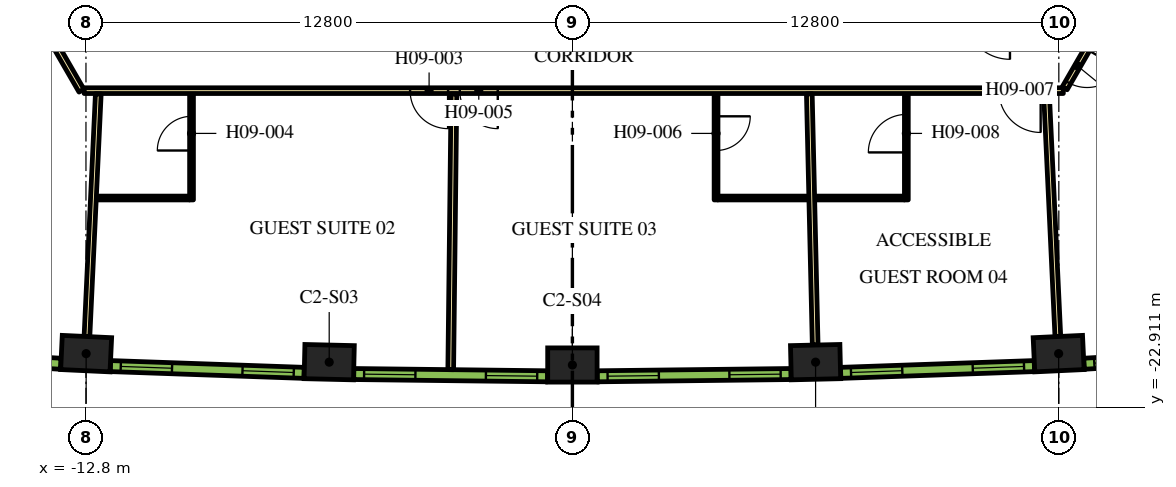
"""IFC4 building model, lengths in metres.
Left out: names, types, materials, properties, quantities, classifications, styles, units other than length and angle.
Written with IfcOpenShell. Run it as: python <this file> out.ifc"""

import sys

from ifc_helpers import new_model, si_unit, direction, frame, frame_2d, origin, origin_2d, place, context, subcontext, project, spatial, rectangle, extrude, element, fill, save


model = new_model("IFC4")
c1 = context("Model", 3, precision=1e-05, world=origin(), true_north=direction((0.0, 1.0)))
c2 = subcontext(c1, "Body", "Model", "MODEL_VIEW")
j1 = project(units=[si_unit("LENGTHUNIT", "METRE"), si_unit("PLANEANGLEUNIT", "RADIAN")], contexts=[c1])
p1 = place(None, origin())
s1 = spatial("IfcSite", under=j1, at=p1, CompositionType="ELEMENT")
p2 = place(p1, origin())
s2 = spatial("IfcBuilding", under=s1, at=p2, CompositionType="ELEMENT")
p3 = place(p2, frame((0.0, 0.0, 118.8)))
s3 = spatial("IfcBuildingStorey", under=s2, at=p3, CompositionType="ELEMENT", Elevation=118.8)
for number, where, z_axis, x_axis in (
    (1, (-12.795, -21.494, 0.0), (0.0, 0.0, 1.0), (0.999, -0.047, 0.0)),
    (2, (-6.399, -21.719, 0.0), (0.0, 0.0, 1.0), (1.0, -0.023, 0.0)),
    (3, (0.0, -21.794, 0.0), (0.0, 0.0, 1.0), (1.0, 0.0, 0.0)),
    (4, (6.399, -21.719, 0.0), (0.0, 0.0, 1.0), (1.0, 0.023, 0.0)),
    (5, (12.795, -21.494, 0.0), (0.0, 0.0, 1.0), (0.999, 0.047, 0.0)),
):
    element("IfcColumn", number, at=place(p3, frame(where, z_axis=z_axis, x_axis=x_axis)), inside=s3, PredefinedType="COLUMN", context=c2, shape_type="SweptSolid", body=[
        extrude(rectangle(XDim=1.3, YDim=0.9, at=origin_2d()), origin(), (0.0, 0.0, 1.0), 3.9),
    ])
p4 = place(p3, frame((-12.918, -14.575, 0.0), z_axis=(0.0, 0.0, 1.0), x_axis=(-0.500009150678, 0.866020120573, 0.0)))
e6 = element("IfcWall", 6, at=p4, inside=s3, PredefinedType="PARTITIONING", context=c2, shape_type="SweptSolid", body=[
    extrude(rectangle(XDim=5.258, YDim=0.15, at=frame_2d((2.629, 0.0))), origin(), (0.0, 0.0, 1.0), 2.75),
])
p5 = place(p3, frame((12.918, -14.575, 0.0), z_axis=(0.0, 0.0, 1.0), x_axis=(-1.0, 0.0, 0.0)))
e7 = element("IfcWall", 7, at=p5, inside=s3, PredefinedType="PARTITIONING", context=c2, shape_type="SweptSolid", body=[
    extrude(rectangle(XDim=25.766, YDim=0.15, at=frame_2d((12.883, 0.0))), origin(), (0.0, 0.0, 1.0), 2.75),
])
p6 = place(p5, frame((16.189, 0.0, 0.0)))
e8 = element("IfcOpeningElement", 8, at=p6, cuts=e7, PredefinedType="OPENING", context=c2, shape_type="SweptSolid", body=[
    extrude(rectangle(XDim=1.0, YDim=2.1, at=frame_2d((0.5, 1.05))), frame((0.0, 0.085, 0.0), z_axis=(0.0, -1.0, 0.0), x_axis=(1.0, 0.0, 0.0)), (0.0, 0.0, 1.0), 0.17),
])
p7 = place(p5, frame((14.882, 0.0, 0.0)))
e9 = element("IfcOpeningElement", 9, at=p7, cuts=e7, PredefinedType="OPENING", context=c2, shape_type="SweptSolid", body=[
    extrude(rectangle(XDim=1.0, YDim=2.1, at=frame_2d((0.5, 1.05))), frame((0.0, 0.085, 0.0), z_axis=(0.0, -1.0, 0.0), x_axis=(1.0, 0.0, 0.0)), (0.0, 0.0, 1.0), 0.17),
])
p8 = place(p5, frame((0.596, 0.0, 0.0)))
e10 = element("IfcOpeningElement", 10, at=p8, cuts=e7, PredefinedType="OPENING", context=c2, shape_type="SweptSolid", body=[
    extrude(rectangle(XDim=1.1, YDim=2.1, at=frame_2d((0.55, 1.05))), frame((0.0, 0.085, 0.0), z_axis=(0.0, -1.0, 0.0), x_axis=(1.0, 0.0, 0.0)), (0.0, 0.0, 1.0), 0.17),
])
p9 = place(p3, frame((15.587, -9.952, 0.0), z_axis=(0.0, 0.0, 1.0), x_axis=(-0.500016618951, -0.866015808616, 0.0)))
e11 = element("IfcWall", 11, at=p9, inside=s3, PredefinedType="PARTITIONING", context=c2, shape_type="SweptSolid", body=[
    extrude(rectangle(XDim=5.268, YDim=0.15, at=frame_2d((2.634, 0.0))), origin(), (0.0, 0.0, 1.0), 2.75),
])
p10 = place(p9, frame((4.088, 0.0, 0.0)))
e12 = element("IfcOpeningElement", 12, at=p10, cuts=e11, PredefinedType="OPENING", context=c2, shape_type="SweptSolid", body=[
    extrude(rectangle(XDim=1.0, YDim=2.1, at=frame_2d((0.5, 1.05))), frame((0.0, 0.085, 0.0), z_axis=(0.0, -1.0, 0.0), x_axis=(1.0, 0.0, 0.0)), (0.0, 0.0, 1.0), 0.17),
])
p11 = place(p3, frame((-12.774, -21.045, 0.0), z_axis=(0.0, 0.0, 1.0), x_axis=(0.046750341626, 0.998906605023, 0.0)))
e13 = element("IfcWall", 13, at=p11, inside=s3, PredefinedType="PARTITIONING", context=c2, shape_type="SweptSolid", body=[
    extrude(rectangle(XDim=6.392, YDim=0.15, at=frame_2d((3.196, 0.0))), origin(), (0.0, 0.0, 1.0), 2.75),
])
p12 = place(p3, frame((-3.202, -21.916, 0.0), z_axis=(0.0, 0.0, 1.0), x_axis=(0.011707696285, 0.999931462575, 0.0)))
e14 = element("IfcWall", 14, at=p12, inside=s3, PredefinedType="PARTITIONING", context=c2, shape_type="SweptSolid", body=[
    extrude(rectangle(XDim=7.257, YDim=0.15, at=frame_2d((3.628, 0.0))), origin(), (0.0, 0.0, 1.0), 2.75),
])
p13 = place(p3, frame((6.389, -21.269, 0.0), z_axis=(0.0, 0.0, 1.0), x_axis=(-0.023377429176, 0.999726710559, 0.0)))
e15 = element("IfcWall", 15, at=p13, inside=s3, PredefinedType="PARTITIONING", context=c2, shape_type="SweptSolid", body=[
    extrude(rectangle(XDim=6.611, YDim=0.15, at=frame_2d((3.305, 0.0))), origin(), (0.0, 0.0, 1.0), 2.75),
])
p14 = place(p3, frame((12.774, -21.045, 0.0), z_axis=(0.0, 0.0, 1.0), x_axis=(-0.046750341626, 0.998906605023, 0.0)))
e16 = element("IfcWall", 16, at=p14, inside=s3, PredefinedType="PARTITIONING", context=c2, shape_type="SweptSolid", body=[
    extrude(rectangle(XDim=6.392, YDim=0.15, at=frame_2d((3.196, 0.0))), origin(), (0.0, 0.0, 1.0), 2.75),
])
p15 = place(p3, frame((-10.022, -17.45, 0.0), z_axis=(0.0, 0.0, 1.0), x_axis=(0.0, 1.0, 0.0)))
e17 = element("IfcWall", 17, at=p15, inside=s3, PredefinedType="PARTITIONING", context=c2, shape_type="SweptSolid", body=[
    extrude(rectangle(XDim=2.8, YDim=0.1, at=frame_2d((1.4, 0.0))), origin(), (0.0, 0.0, 1.0), 2.75),
])
p16 = place(p15, frame((1.3, 0.0, 0.0)))
e18 = element("IfcOpeningElement", 18, at=p16, cuts=e17, PredefinedType="OPENING", context=c2, shape_type="SweptSolid", body=[
    extrude(rectangle(XDim=0.9, YDim=2.1, at=frame_2d((0.45, 1.05))), frame((0.0, 0.06, 0.0), z_axis=(0.0, -1.0, 0.0), x_axis=(1.0, 0.0, 0.0)), (0.0, 0.0, 1.0), 0.12),
])
p17 = place(p3, frame((-10.072, -17.4, 0.0), z_axis=(0.0, 0.0, 1.0), x_axis=(-1.0, 0.0, 0.0)))
e19 = element("IfcWall", 19, at=p17, inside=s3, PredefinedType="PARTITIONING", context=c2, shape_type="SweptSolid", body=[
    extrude(rectangle(XDim=2.45, YDim=0.1, at=frame_2d((1.225, 0.0))), origin(), (0.0, 0.0, 1.0), 2.75),
])
p18 = place(p3, frame((3.78, -14.65, 0.0), z_axis=(0.0, 0.0, 1.0), x_axis=(0.0, -1.0, 0.0)))
e20 = element("IfcWall", 20, at=p18, inside=s3, PredefinedType="PARTITIONING", context=c2, shape_type="SweptSolid", body=[
    extrude(rectangle(XDim=2.8, YDim=0.1, at=frame_2d((1.4, 0.0))), origin(), (0.0, 0.0, 1.0), 2.75),
])
p19 = place(p18, frame((0.6, 0.0, 0.0)))
e21 = element("IfcOpeningElement", 21, at=p19, cuts=e20, PredefinedType="OPENING", context=c2, shape_type="SweptSolid", body=[
    extrude(rectangle(XDim=0.9, YDim=2.1, at=frame_2d((0.45, 1.05))), frame((0.0, 0.06, 0.0), z_axis=(0.0, -1.0, 0.0), x_axis=(1.0, 0.0, 0.0)), (0.0, 0.0, 1.0), 0.12),
])
p20 = place(p3, frame((3.83, -17.4, 0.0), z_axis=(0.0, 0.0, 1.0), x_axis=(1.0, 0.0, 0.0)))
e22 = element("IfcWall", 22, at=p20, inside=s3, PredefinedType="PARTITIONING", context=c2, shape_type="SweptSolid", body=[
    extrude(rectangle(XDim=2.39, YDim=0.1, at=frame_2d((1.195, 0.0))), origin(), (0.0, 0.0, 1.0), 2.75),
])
p21 = place(p3, frame((8.788, -17.45, 0.0), z_axis=(0.0, 0.0, 1.0), x_axis=(0.0, 1.0, 0.0)))
e23 = element("IfcWall", 23, at=p21, inside=s3, PredefinedType="PARTITIONING", context=c2, shape_type="SweptSolid", body=[
    extrude(rectangle(XDim=2.8, YDim=0.1, at=frame_2d((1.4, 0.0))), origin(), (0.0, 0.0, 1.0), 2.75),
])
p22 = place(p21, frame((1.25, 0.0, 0.0)))
e24 = element("IfcOpeningElement", 24, at=p22, cuts=e23, PredefinedType="OPENING", context=c2, shape_type="SweptSolid", body=[
    extrude(rectangle(XDim=1.0, YDim=2.1, at=frame_2d((0.5, 1.05))), frame((0.0, 0.06, 0.0), z_axis=(0.0, -1.0, 0.0), x_axis=(1.0, 0.0, 0.0)), (0.0, 0.0, 1.0), 0.12),
])
p23 = place(p3, frame((8.738, -17.4, 0.0), z_axis=(0.0, 0.0, 1.0), x_axis=(-1.0, 0.0, 0.0)))
e25 = element("IfcWall", 25, at=p23, inside=s3, PredefinedType="PARTITIONING", context=c2, shape_type="SweptSolid", body=[
    extrude(rectangle(XDim=2.36, YDim=0.1, at=frame_2d((1.18, 0.0))), origin(), (0.0, 0.0, 1.0), 2.75),
])
p24 = place(p3, frame((-18.553, -21.463, 0.0), z_axis=(0.0, 0.0, 1.0), x_axis=(0.998290511436, -0.058447025388, 0.0)))
e26 = element("IfcWall", 26, at=p24, inside=s3, PredefinedType="SOLIDWALL", context=c2, shape_type="SweptSolid", body=[
    extrude(rectangle(XDim=5.1, YDim=0.29, at=frame_2d((2.55, 0.0))), origin(), (0.0, 0.0, 1.0), 3.65),
])
p25 = place(p24, frame((0.273, 0.0, 0.9)))
e27 = element("IfcOpeningElement", 27, at=p25, cuts=e26, PredefinedType="OPENING", context=c2, shape_type="SweptSolid", body=[
    extrude(rectangle(XDim=1.35, YDim=2.15, at=frame_2d((0.675, 1.075))), frame((0.0, 0.155, 0.0), z_axis=(0.0, -1.0, 0.0), x_axis=(1.0, 0.0, 0.0)), (0.0, 0.0, 1.0), 0.31),
])
p26 = place(p24, frame((3.478, 0.0, 0.9)))
e28 = element("IfcOpeningElement", 28, at=p26, cuts=e26, PredefinedType="OPENING", context=c2, shape_type="SweptSolid", body=[
    extrude(rectangle(XDim=1.35, YDim=2.15, at=frame_2d((0.675, 1.075))), frame((0.0, 0.155, 0.0), z_axis=(0.0, -1.0, 0.0), x_axis=(1.0, 0.0, 0.0)), (0.0, 0.0, 1.0), 0.31),
])
p27 = place(p3, frame((-12.157, -21.822, 0.0), z_axis=(0.0, 0.0, 1.0), x_axis=(0.999385993957, -0.035037623812, 0.0)))
e29 = element("IfcWall", 29, at=p27, inside=s3, PredefinedType="SOLIDWALL", context=c2, shape_type="SweptSolid", body=[
    extrude(rectangle(XDim=5.101, YDim=0.29, at=frame_2d((2.55, 0.0))), origin(), (0.0, 0.0, 1.0), 3.65),
])
p28 = place(p27, frame((0.273, 0.0, 0.9)))
e30 = element("IfcOpeningElement", 30, at=p28, cuts=e29, PredefinedType="OPENING", context=c2, shape_type="SweptSolid", body=[
    extrude(rectangle(XDim=1.35, YDim=2.15, at=frame_2d((0.675, 1.075))), frame((0.0, 0.155, 0.0), z_axis=(0.0, -1.0, 0.0), x_axis=(1.0, 0.0, 0.0)), (0.0, 0.0, 1.0), 0.31),
])
p29 = place(p27, frame((3.478, 0.0, 0.9)))
e31 = element("IfcOpeningElement", 31, at=p29, cuts=e29, PredefinedType="OPENING", context=c2, shape_type="SweptSolid", body=[
    extrude(rectangle(XDim=1.35, YDim=2.15, at=frame_2d((0.675, 1.075))), frame((0.0, 0.155, 0.0), z_axis=(0.0, -1.0, 0.0), x_axis=(1.0, 0.0, 0.0)), (0.0, 0.0, 1.0), 0.31),
])
p30 = place(p3, frame((-5.753, -22.031, 0.0), z_axis=(0.0, 0.0, 1.0), x_axis=(0.999931786565, -0.011679992145, 0.0)))
e32 = element("IfcWall", 32, at=p30, inside=s3, PredefinedType="SOLIDWALL", context=c2, shape_type="SweptSolid", body=[
    extrude(rectangle(XDim=5.1, YDim=0.29, at=frame_2d((2.55, 0.0))), origin(), (0.0, 0.0, 1.0), 3.65),
])
p31 = place(p30, frame((0.272, 0.0, 0.9)))
e33 = element("IfcOpeningElement", 33, at=p31, cuts=e32, PredefinedType="OPENING", context=c2, shape_type="SweptSolid", body=[
    extrude(rectangle(XDim=1.35, YDim=2.15, at=frame_2d((0.675, 1.075))), frame((0.0, 0.155, 0.0), z_axis=(0.0, -1.0, 0.0), x_axis=(1.0, 0.0, 0.0)), (0.0, 0.0, 1.0), 0.31),
])
p32 = place(p30, frame((3.478, 0.0, 0.9)))
e34 = element("IfcOpeningElement", 34, at=p32, cuts=e32, PredefinedType="OPENING", context=c2, shape_type="SweptSolid", body=[
    extrude(rectangle(XDim=1.35, YDim=2.15, at=frame_2d((0.675, 1.075))), frame((0.0, 0.155, 0.0), z_axis=(0.0, -1.0, 0.0), x_axis=(1.0, 0.0, 0.0)), (0.0, 0.0, 1.0), 0.31),
])
p33 = place(p3, frame((0.653, -22.091, 0.0), z_axis=(0.0, 0.0, 1.0), x_axis=(0.999931786565, 0.011679992145, 0.0)))
e35 = element("IfcWall", 35, at=p33, inside=s3, PredefinedType="SOLIDWALL", context=c2, shape_type="SweptSolid", body=[
    extrude(rectangle(XDim=5.1, YDim=0.29, at=frame_2d((2.55, 0.0))), origin(), (0.0, 0.0, 1.0), 3.65),
])
p34 = place(p33, frame((0.273, 0.0, 0.9)))
e36 = element("IfcOpeningElement", 36, at=p34, cuts=e35, PredefinedType="OPENING", context=c2, shape_type="SweptSolid", body=[
    extrude(rectangle(XDim=1.35, YDim=2.15, at=frame_2d((0.675, 1.075))), frame((0.0, 0.155, 0.0), z_axis=(0.0, -1.0, 0.0), x_axis=(1.0, 0.0, 0.0)), (0.0, 0.0, 1.0), 0.31),
])
p35 = place(p33, frame((3.478, 0.0, 0.9)))
e37 = element("IfcOpeningElement", 37, at=p35, cuts=e35, PredefinedType="OPENING", context=c2, shape_type="SweptSolid", body=[
    extrude(rectangle(XDim=1.35, YDim=2.15, at=frame_2d((0.675, 1.075))), frame((0.0, 0.155, 0.0), z_axis=(0.0, -1.0, 0.0), x_axis=(1.0, 0.0, 0.0)), (0.0, 0.0, 1.0), 0.31),
])
p36 = place(p3, frame((7.059, -22.001, 0.0), z_axis=(0.0, 0.0, 1.0), x_axis=(0.999385993957, 0.035037623812, 0.0)))
e38 = element("IfcWall", 38, at=p36, inside=s3, PredefinedType="SOLIDWALL", context=c2, shape_type="SweptSolid", body=[
    extrude(rectangle(XDim=5.101, YDim=0.29, at=frame_2d((2.55, 0.0))), origin(), (0.0, 0.0, 1.0), 3.65),
])
p37 = place(p36, frame((0.273, 0.0, 0.9)))
e39 = element("IfcOpeningElement", 39, at=p37, cuts=e38, PredefinedType="OPENING", context=c2, shape_type="SweptSolid", body=[
    extrude(rectangle(XDim=1.35, YDim=2.15, at=frame_2d((0.675, 1.075))), frame((0.0, 0.155, 0.0), z_axis=(0.0, -1.0, 0.0), x_axis=(1.0, 0.0, 0.0)), (0.0, 0.0, 1.0), 0.31),
])
p38 = place(p36, frame((3.478, 0.0, 0.9)))
e40 = element("IfcOpeningElement", 40, at=p38, cuts=e38, PredefinedType="OPENING", context=c2, shape_type="SweptSolid", body=[
    extrude(rectangle(XDim=1.35, YDim=2.15, at=frame_2d((0.675, 1.075))), frame((0.0, 0.155, 0.0), z_axis=(0.0, -1.0, 0.0), x_axis=(1.0, 0.0, 0.0)), (0.0, 0.0, 1.0), 0.31),
])
p39 = place(p3, frame((13.462, -21.761, 0.0), z_axis=(0.0, 0.0, 1.0), x_axis=(0.998290511436, 0.058447025388, 0.0)))
e41 = element("IfcWall", 41, at=p39, inside=s3, PredefinedType="SOLIDWALL", context=c2, shape_type="SweptSolid", body=[
    extrude(rectangle(XDim=5.1, YDim=0.29, at=frame_2d((2.55, 0.0))), origin(), (0.0, 0.0, 1.0), 3.65),
])
p40 = place(p39, frame((0.272, 0.0, 0.9)))
e42 = element("IfcOpeningElement", 42, at=p40, cuts=e41, PredefinedType="OPENING", context=c2, shape_type="SweptSolid", body=[
    extrude(rectangle(XDim=1.35, YDim=2.15, at=frame_2d((0.675, 1.075))), frame((0.0, 0.155, 0.0), z_axis=(0.0, -1.0, 0.0), x_axis=(1.0, 0.0, 0.0)), (0.0, 0.0, 1.0), 0.31),
])
p41 = place(p39, frame((3.478, 0.0, 0.9)))
e43 = element("IfcOpeningElement", 43, at=p41, cuts=e41, PredefinedType="OPENING", context=c2, shape_type="SweptSolid", body=[
    extrude(rectangle(XDim=1.35, YDim=2.15, at=frame_2d((0.675, 1.075))), frame((0.0, 0.155, 0.0), z_axis=(0.0, -1.0, 0.0), x_axis=(1.0, 0.0, 0.0)), (0.0, 0.0, 1.0), 0.31),
])
p42 = place(p6, origin())
e44 = element("IfcDoor", 44, at=p42, inside=s3, OperationType="SINGLE_SWING_LEFT", PredefinedType="DOOR", context=c2, shape_type="SweptSolid", body=[
    extrude(rectangle(XDim=1.0, YDim=2.1, at=frame_2d((0.5, 1.05))), frame((0.0, 0.025, 0.0), z_axis=(0.0, -1.0, 0.0), x_axis=(1.0, 0.0, 0.0)), (0.0, 0.0, 1.0), 0.05),
])
fill(e8, e44)
p43 = place(p16, origin())
e45 = element("IfcDoor", 45, at=p43, inside=s3, OperationType="SINGLE_SWING_LEFT", PredefinedType="DOOR", context=c2, shape_type="SweptSolid", body=[
    extrude(rectangle(XDim=0.9, YDim=2.1, at=frame_2d((0.45, 1.05))), frame((0.0, 0.025, 0.0), z_axis=(0.0, -1.0, 0.0), x_axis=(1.0, 0.0, 0.0)), (0.0, 0.0, 1.0), 0.05),
])
fill(e18, e45)
p44 = place(p7, origin())
e46 = element("IfcDoor", 46, at=p44, inside=s3, OperationType="SINGLE_SWING_RIGHT", PredefinedType="DOOR", context=c2, shape_type="SweptSolid", body=[
    extrude(rectangle(XDim=1.0, YDim=2.1, at=frame_2d((0.5, 1.05))), frame((0.0, 0.025, 0.0), z_axis=(0.0, -1.0, 0.0), x_axis=(1.0, 0.0, 0.0)), (0.0, 0.0, 1.0), 0.05),
])
fill(e9, e46)
p45 = place(p19, origin())
e47 = element("IfcDoor", 47, at=p45, inside=s3, OperationType="SINGLE_SWING_RIGHT", PredefinedType="DOOR", context=c2, shape_type="SweptSolid", body=[
    extrude(rectangle(XDim=0.9, YDim=2.1, at=frame_2d((0.45, 1.05))), frame((0.0, 0.025, 0.0), z_axis=(0.0, -1.0, 0.0), x_axis=(1.0, 0.0, 0.0)), (0.0, 0.0, 1.0), 0.05),
])
fill(e21, e47)
p46 = place(p8, origin())
e48 = element("IfcDoor", 48, at=p46, inside=s3, OperationType="SINGLE_SWING_LEFT", PredefinedType="DOOR", context=c2, shape_type="SweptSolid", body=[
    extrude(rectangle(XDim=1.1, YDim=2.1, at=frame_2d((0.55, 1.05))), frame((0.0, 0.025, 0.0), z_axis=(0.0, -1.0, 0.0), x_axis=(1.0, 0.0, 0.0)), (0.0, 0.0, 1.0), 0.05),
])
fill(e10, e48)
p47 = place(p22, origin())
e49 = element("IfcDoor", 49, at=p47, inside=s3, OperationType="SINGLE_SWING_LEFT", PredefinedType="DOOR", context=c2, shape_type="SweptSolid", body=[
    extrude(rectangle(XDim=1.0, YDim=2.1, at=frame_2d((0.5, 1.05))), frame((0.0, 0.025, 0.0), z_axis=(0.0, -1.0, 0.0), x_axis=(1.0, 0.0, 0.0)), (0.0, 0.0, 1.0), 0.05),
])
fill(e24, e49)
p48 = place(p10, origin())
e50 = element("IfcDoor", 50, at=p48, inside=s3, OperationType="SINGLE_SWING_RIGHT", PredefinedType="DOOR", context=c2, shape_type="SweptSolid", body=[
    extrude(rectangle(XDim=1.0, YDim=2.1, at=frame_2d((0.5, 1.05))), frame((0.0, 0.025, 0.0), z_axis=(0.0, -1.0, 0.0), x_axis=(1.0, 0.0, 0.0)), (0.0, 0.0, 1.0), 0.05),
])
fill(e12, e50)
p49 = place(p28, origin())
e51 = element("IfcWindow", 51, at=p49, inside=s3, PartitioningType="DOUBLE_PANEL_VERTICAL", PredefinedType="WINDOW", context=c2, shape_type="SweptSolid", body=[
    extrude(rectangle(XDim=1.35, YDim=2.15, at=frame_2d((0.675, 1.075))), frame((0.0, 0.015, 0.0), z_axis=(0.0, -1.0, 0.0), x_axis=(1.0, 0.0, 0.0)), (0.0, 0.0, 1.0), 0.06),
])
fill(e30, e51)
p50 = place(p29, origin())
e52 = element("IfcWindow", 52, at=p50, inside=s3, PartitioningType="DOUBLE_PANEL_VERTICAL", PredefinedType="WINDOW", context=c2, shape_type="SweptSolid", body=[
    extrude(rectangle(XDim=1.35, YDim=2.15, at=frame_2d((0.675, 1.075))), frame((0.0, 0.015, 0.0), z_axis=(0.0, -1.0, 0.0), x_axis=(1.0, 0.0, 0.0)), (0.0, 0.0, 1.0), 0.06),
])
fill(e31, e52)
p51 = place(p31, origin())
e53 = element("IfcWindow", 53, at=p51, inside=s3, PartitioningType="DOUBLE_PANEL_VERTICAL", PredefinedType="WINDOW", context=c2, shape_type="SweptSolid", body=[
    extrude(rectangle(XDim=1.35, YDim=2.15, at=frame_2d((0.675, 1.075))), frame((0.0, 0.015, 0.0), z_axis=(0.0, -1.0, 0.0), x_axis=(1.0, 0.0, 0.0)), (0.0, 0.0, 1.0), 0.06),
])
fill(e33, e53)
p52 = place(p32, origin())
e54 = element("IfcWindow", 54, at=p52, inside=s3, PartitioningType="DOUBLE_PANEL_VERTICAL", PredefinedType="WINDOW", context=c2, shape_type="SweptSolid", body=[
    extrude(rectangle(XDim=1.35, YDim=2.15, at=frame_2d((0.675, 1.075))), frame((0.0, 0.015, 0.0), z_axis=(0.0, -1.0, 0.0), x_axis=(1.0, 0.0, 0.0)), (0.0, 0.0, 1.0), 0.06),
])
fill(e34, e54)
p53 = place(p34, origin())
e55 = element("IfcWindow", 55, at=p53, inside=s3, PartitioningType="DOUBLE_PANEL_VERTICAL", PredefinedType="WINDOW", context=c2, shape_type="SweptSolid", body=[
    extrude(rectangle(XDim=1.35, YDim=2.15, at=frame_2d((0.675, 1.075))), frame((0.0, 0.015, 0.0), z_axis=(0.0, -1.0, 0.0), x_axis=(1.0, 0.0, 0.0)), (0.0, 0.0, 1.0), 0.06),
])
fill(e36, e55)
p54 = place(p35, origin())
e56 = element("IfcWindow", 56, at=p54, inside=s3, PartitioningType="DOUBLE_PANEL_VERTICAL", PredefinedType="WINDOW", context=c2, shape_type="SweptSolid", body=[
    extrude(rectangle(XDim=1.35, YDim=2.15, at=frame_2d((0.675, 1.075))), frame((0.0, 0.015, 0.0), z_axis=(0.0, -1.0, 0.0), x_axis=(1.0, 0.0, 0.0)), (0.0, 0.0, 1.0), 0.06),
])
fill(e37, e56)
p55 = place(p37, origin())
e57 = element("IfcWindow", 57, at=p55, inside=s3, PartitioningType="DOUBLE_PANEL_VERTICAL", PredefinedType="WINDOW", context=c2, shape_type="SweptSolid", body=[
    extrude(rectangle(XDim=1.35, YDim=2.15, at=frame_2d((0.675, 1.075))), frame((0.0, 0.015, 0.0), z_axis=(0.0, -1.0, 0.0), x_axis=(1.0, 0.0, 0.0)), (0.0, 0.0, 1.0), 0.06),
])
fill(e39, e57)
p56 = place(p38, origin())
e58 = element("IfcWindow", 58, at=p56, inside=s3, PartitioningType="DOUBLE_PANEL_VERTICAL", PredefinedType="WINDOW", context=c2, shape_type="SweptSolid", body=[
    extrude(rectangle(XDim=1.35, YDim=2.15, at=frame_2d((0.675, 1.075))), frame((0.0, 0.015, 0.0), z_axis=(0.0, -1.0, 0.0), x_axis=(1.0, 0.0, 0.0)), (0.0, 0.0, 1.0), 0.06),
])
fill(e40, e58)
p57 = place(p40, origin())
e59 = element("IfcWindow", 59, at=p57, inside=s3, PartitioningType="DOUBLE_PANEL_VERTICAL", PredefinedType="WINDOW", context=c2, shape_type="SweptSolid", body=[
    extrude(rectangle(XDim=1.35, YDim=2.15, at=frame_2d((0.675, 1.075))), frame((0.0, 0.015, 0.0), z_axis=(0.0, -1.0, 0.0), x_axis=(1.0, 0.0, 0.0)), (0.0, 0.0, 1.0), 0.06),
])
fill(e42, e59)
save(model, sys.argv[1])
